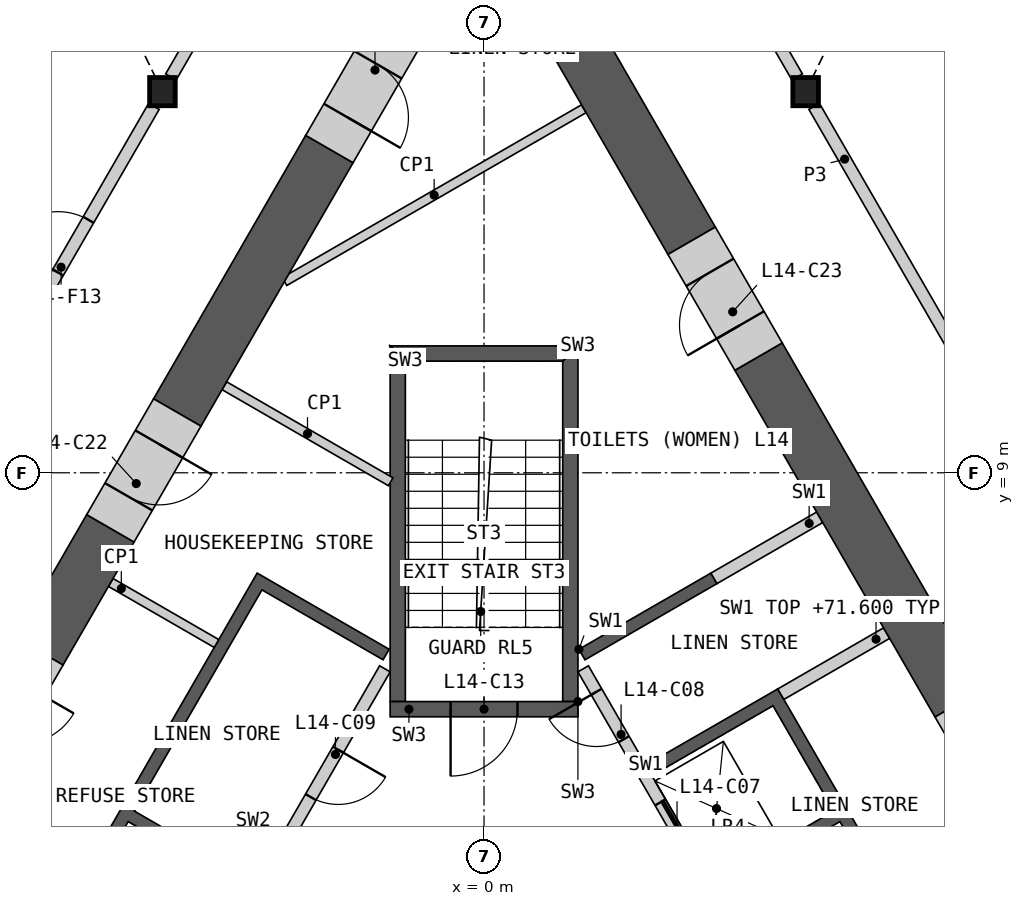
"""IFC4 building model, lengths in metres.
Left out: names, types, materials, properties, quantities, classifications, styles, units other than length and angle.
Written with IfcOpenShell. Run it as: python <this file> out.ifc"""

import sys

from ifc_helpers import new_model, si_unit, direction, frame, frame_2d, origin, origin_2d, place, context, subcontext, project, spatial, polyline, rectangle, i_section, outline, extrude, element, fill, save


model = new_model("IFC4")
c1 = context("Model", 3, precision=1e-05, world=origin(), true_north=direction((0.0, 1.0)))
c2 = subcontext(c1, "Body", "Model", "MODEL_VIEW")
j1 = project(units=[si_unit("LENGTHUNIT", "METRE"), si_unit("PLANEANGLEUNIT", "RADIAN")], contexts=[c1])
p1 = place(None, origin())
s1 = spatial("IfcSite", under=j1, at=p1, CompositionType="ELEMENT")
p2 = place(p1, origin())
s2 = spatial("IfcBuilding", under=s1, at=p2, CompositionType="ELEMENT")
p3 = place(p2, frame((0.0, 0.0, 67.8)))
s3 = spatial("IfcBuildingStorey", under=s2, at=p3, CompositionType="ELEMENT", Elevation=67.8)
for number, where, z_axis, x_axis in (
    (1, (-5.289, 15.269, 0.0), (0.0, 0.0, 1.0), (1.0, 0.0, 0.0)),
    (2, (5.289, 15.269, 0.0), (0.0, 0.0, 1.0), (1.0, 0.0, 0.0)),
):
    element("IfcColumn", number, at=place(p3, frame(where, z_axis=z_axis, x_axis=x_axis)), inside=s3, PredefinedType="COLUMN", context=c2, shape_type="SweptSolid", body=[
        extrude(i_section(OverallWidth=0.421, OverallDepth=0.465, WebThickness=0.045, FlangeThickness=0.072, at=origin_2d()), origin(), (0.0, 0.0, 1.0), 4.2),
    ])
p4 = place(p3, origin())
e3 = element("IfcWall", 3, at=p4, inside=s3, PredefinedType="SHEAR", context=c2, shape_type="SweptSolid", body=[
    extrude(outline(polyline([(1.561, 6.097), (3.731, 7.35), (3.831, 7.177), (1.66, 5.924), (1.561, 6.097)])), origin(), (0.0, 0.0, 1.0), 3.8),
])
p5 = place(p3, origin())
e4 = element("IfcWall", 4, at=p5, inside=s3, PredefinedType="SHEAR", context=c2, shape_type="SweptSolid", body=[
    extrude(outline(polyline([(2.66, 4.192), (4.831, 5.445), (8.231, -0.444), (6.061, -1.697), (5.96, -1.524), (7.952, -0.374), (6.952, 1.358), (4.96, 0.208), (4.861, 0.381), (6.852, 1.531), (5.852, 3.263), (3.861, 2.113), (3.76, 2.287), (5.752, 3.437), (4.752, 5.169), (2.76, 4.019), (2.66, 4.192)])), origin(), (0.0, 0.0, 1.0), 3.8),
])
p6 = place(p3, frame((5.817, -1.476, 0.0), z_axis=(0.0, 0.0, 1.0), x_axis=(-0.500002616675, 0.866023893041, 0.0)))
e5 = element("IfcWall", 5, at=p6, inside=s3, PredefinedType="SOLIDWALL", context=c2, shape_type="SweptSolid", body=[
    extrude(rectangle(XDim=8.373, YDim=0.2, at=frame_2d((4.187, 0.0))), origin(), (0.0, 0.0, 1.0), 3.8),
])
p7 = place(p6, frame((0.337, 0.0, 0.0)))
e6 = element("IfcOpeningElement", 6, at=p7, cuts=e5, PredefinedType="OPENING", context=c2, shape_type="SweptSolid", body=[
    extrude(rectangle(XDim=1.1, YDim=2.1, at=frame_2d((0.55, 1.05))), frame((0.0, 0.11, 0.0), z_axis=(0.0, -1.0, 0.0), x_axis=(1.0, 0.0, 0.0)), (0.0, 0.0, 1.0), 0.22),
])
p8 = place(p6, frame((2.537, 0.0, 0.0)))
e7 = element("IfcOpeningElement", 7, at=p8, cuts=e5, PredefinedType="OPENING", context=c2, shape_type="SweptSolid", body=[
    extrude(rectangle(XDim=1.1, YDim=2.1, at=frame_2d((0.55, 1.05))), frame((0.0, 0.11, 0.0), z_axis=(0.0, -1.0, 0.0), x_axis=(1.0, 0.0, 0.0)), (0.0, 0.0, 1.0), 0.22),
])
p9 = place(p6, frame((4.737, 0.0, 0.0)))
e8 = element("IfcOpeningElement", 8, at=p9, cuts=e5, PredefinedType="OPENING", context=c2, shape_type="SweptSolid", body=[
    extrude(rectangle(XDim=1.1, YDim=2.1, at=frame_2d((0.55, 1.05))), frame((0.0, 0.11, 0.0), z_axis=(0.0, -1.0, 0.0), x_axis=(1.0, 0.0, 0.0)), (0.0, 0.0, 1.0), 0.22),
])
p10 = place(p6, frame((7.037, 0.0, 0.0)))
e9 = element("IfcOpeningElement", 9, at=p10, cuts=e5, PredefinedType="OPENING", context=c2, shape_type="SweptSolid", body=[
    extrude(rectangle(XDim=0.9, YDim=2.1, at=frame_2d((0.45, 1.05))), frame((0.0, 0.11, 0.0), z_axis=(0.0, -1.0, 0.0), x_axis=(1.0, 0.0, 0.0)), (0.0, 0.0, 1.0), 0.22),
])
p11 = place(p3, frame((4.881, 5.358, 0.0), z_axis=(0.0, 0.0, 1.0), x_axis=(0.866035824272, 0.499981950752, 0.0)))
e10 = element("IfcWall", 10, at=p11, inside=s3, PredefinedType="SHEAR", context=c2, shape_type="SweptSolid", body=[
    extrude(rectangle(XDim=2.009, YDim=0.2, at=frame_2d((1.004, 0.0))), origin(), (0.0, 0.0, 1.0), 3.8),
])
p12 = place(p3, frame((3.781, 7.263, 0.0), z_axis=(0.0, 0.0, 1.0), x_axis=(0.865983199114, 0.50007309351, 0.0)))
e11 = element("IfcWall", 11, at=p12, inside=s3, PredefinedType="SHEAR", context=c2, shape_type="SweptSolid", body=[
    extrude(rectangle(XDim=2.009, YDim=0.2, at=frame_2d((1.004, 0.0))), origin(), (0.0, 0.0, 1.0), 3.8),
])
p13 = place(p3, origin())
e12 = element("IfcWall", 12, at=p13, inside=s3, PredefinedType="SHEAR", context=c2, shape_type="SweptSolid", body=[
    extrude(outline(polyline([(-4.96, 0.208), (-7.131, 1.461), (-3.731, 7.35), (-1.561, 6.097), (-1.66, 5.924), (-3.652, 7.074), (-5.752, 3.437), (-3.76, 2.287), (-3.861, 2.113), (-5.852, 3.263), (-6.852, 1.531), (-4.861, 0.381), (-4.96, 0.208)])), origin(), (0.0, 0.0, 1.0), 3.8),
])
p14 = place(p3, frame((-1.631, 5.776, 0.0), z_axis=(0.0, 0.0, 1.0), x_axis=(-0.499992876559, -0.866029516466, 0.0)))
e13 = element("IfcWall", 13, at=p14, inside=s3, PredefinedType="SOLIDWALL", context=c2, shape_type="SweptSolid", body=[
    extrude(rectangle(XDim=6.486, YDim=0.2, at=frame_2d((3.243, 0.0))), origin(), (0.0, 0.0, 1.0), 3.8),
])
p15 = place(p14, frame((1.537, 0.0, 0.0)))
e14 = element("IfcOpeningElement", 14, at=p15, cuts=e13, PredefinedType="OPENING", context=c2, shape_type="SweptSolid", body=[
    extrude(rectangle(XDim=0.9, YDim=2.1, at=frame_2d((0.45, 1.05))), frame((0.0, 0.11, 0.0), z_axis=(0.0, -1.0, 0.0), x_axis=(1.0, 0.0, 0.0)), (0.0, 0.0, 1.0), 0.22),
])
p16 = place(p3, origin())
e15 = element("IfcWall", 15, at=p16, inside=s3, PredefinedType="SHEAR", context=c2, shape_type="SweptSolid", body=[
    extrude(outline(polyline([(1.544, 5.237), (1.544, 11.087), (1.294, 10.837), (1.294, 5.237), (1.544, 5.237)])), origin(), (0.0, 0.0, 1.0), 3.8),
])
p17 = place(p3, origin())
e16 = element("IfcWall", 16, at=p17, inside=s3, PredefinedType="SHEAR", context=c2, shape_type="SweptSolid", body=[
    extrude(outline(polyline([(1.544, 11.087), (-1.544, 11.087), (-1.294, 10.837), (1.294, 10.837), (1.544, 11.087)])), origin(), (0.0, 0.0, 1.0), 3.8),
])
p18 = place(p3, origin())
e17 = element("IfcWall", 17, at=p18, inside=s3, PredefinedType="SHEAR", context=c2, shape_type="SweptSolid", body=[
    extrude(outline(polyline([(-1.294, 10.837), (-1.544, 11.087), (-1.544, 5.237), (-1.294, 5.237), (-1.294, 10.837)])), origin(), (0.0, 0.0, 1.0), 3.8),
])
p19 = place(p3, frame((1.544, 5.112, 0.0), z_axis=(0.0, 0.0, 1.0), x_axis=(-1.0, 0.0, 0.0)))
e18 = element("IfcWall", 18, at=p19, inside=s3, PredefinedType="SHEAR", context=c2, shape_type="SweptSolid", body=[
    extrude(rectangle(XDim=3.088, YDim=0.25, at=frame_2d((1.544, 0.0))), origin(), (0.0, 0.0, 1.0), 3.8),
])
p20 = place(p19, frame((0.994, 0.0, 0.0)))
e19 = element("IfcOpeningElement", 19, at=p20, cuts=e18, PredefinedType="OPENING", context=c2, shape_type="SweptSolid", body=[
    extrude(rectangle(XDim=1.1, YDim=2.1, at=frame_2d((0.55, 1.05))), frame((0.0, 0.135, 0.0), z_axis=(0.0, -1.0, 0.0), x_axis=(1.0, 0.0, 0.0)), (0.0, 0.0, 1.0), 0.27),
])
p21 = place(p3, frame((-6.139, 7.196, 0.0), z_axis=(0.0, 0.0, 1.0), x_axis=(0.866035824272, -0.499981950752, 0.0)))
e20 = element("IfcWall", 20, at=p21, inside=s3, PredefinedType="PARTITIONING", context=c2, shape_type="SweptSolid", body=[
    extrude(rectangle(XDim=2.009, YDim=0.15, at=frame_2d((1.004, 0.0))), origin(), (0.0, 0.0, 1.0), 3.8),
])
p22 = place(p3, frame((-4.271, 10.432, 0.0), z_axis=(0.0, 0.0, 1.0), x_axis=(0.866018279777, -0.50001233894, 0.0)))
e21 = element("IfcWall", 21, at=p22, inside=s3, PredefinedType="PARTITIONING", context=c2, shape_type="SweptSolid", body=[
    extrude(rectangle(XDim=3.159, YDim=0.15, at=frame_2d((1.58, 0.0))), origin(), (0.0, 0.0, 1.0), 3.8),
])
p23 = place(p3, frame((1.641, 14.987, 0.0), z_axis=(0.0, 0.0, 1.0), x_axis=(-0.86602253128, -0.50000497529, 0.0)))
e22 = element("IfcWall", 22, at=p23, inside=s3, PredefinedType="PARTITIONING", context=c2, shape_type="SweptSolid", body=[
    extrude(rectangle(XDim=5.685, YDim=0.15, at=frame_2d((2.843, 0.0))), origin(), (0.0, 0.0, 1.0), 3.8),
])
p24 = place(p3, frame((7.807, 5.208, 0.0), z_axis=(0.0, 0.0, 1.0), x_axis=(-0.499986664161, 0.866033103098, 0.0)))
e23 = element("IfcWall", 23, at=p24, inside=s3, PredefinedType="SHEAR", context=c2, shape_type="SweptSolid", body=[
    extrude(rectangle(XDim=6.586, YDim=0.9, at=frame_2d((3.293, 0.0))), origin(), (0.0, 0.0, 1.0), 3.8),
])
p25 = place(p3, frame((3.414, 12.816, 0.0), z_axis=(0.0, 0.0, 1.0), x_axis=(-0.500006596359, 0.866021595341, 0.0)))
e24 = element("IfcWall", 24, at=p25, inside=s3, PredefinedType="SHEAR", context=c2, shape_type="SweptSolid", body=[
    extrude(rectangle(XDim=6.049, YDim=0.9, at=frame_2d((3.025, 0.0))), origin(), (0.0, 0.0, 1.0), 3.8),
])
p26 = place(p3, frame((-2.543, 14.325, 0.0), z_axis=(0.0, 0.0, 1.0), x_axis=(-0.500006859004, -0.866021443701, 0.0)))
e25 = element("IfcWall", 25, at=p26, inside=s3, PredefinedType="SHEAR", context=c2, shape_type="SweptSolid", body=[
    extrude(rectangle(XDim=5.003, YDim=0.9, at=frame_2d((2.502, 0.0))), origin(), (0.0, 0.0, 1.0), 3.8),
])
p27 = place(p3, frame((-6.145, 8.086, 0.0), z_axis=(0.0, 0.0, 1.0), x_axis=(-0.500026924946, -0.866009858102, 0.0)))
e26 = element("IfcWall", 26, at=p27, inside=s3, PredefinedType="SHEAR", context=c2, shape_type="SweptSolid", body=[
    extrude(rectangle(XDim=2.337, YDim=0.9, at=frame_2d((1.168, 0.0))), origin(), (0.0, 0.0, 1.0), 3.8),
])
p28 = place(p3, frame((8.907, 3.302, 0.0), z_axis=(0.0, 0.0, 1.0), x_axis=(-0.50002983664, 0.866008176907, 0.0)))
e27 = element("IfcWall", 27, at=p28, inside=s3, PredefinedType="SHEAR", context=c2, shape_type="SweptSolid", body=[
    extrude(rectangle(XDim=2.2, YDim=0.9, at=frame_2d((1.1, 0.0))), origin(), (0.0, 0.0, 1.0), 3.8),
])
p29 = place(p28, frame((0.6, 0.0, 0.0)))
e28 = element("IfcOpeningElement", 28, at=p29, cuts=e27, PredefinedType="OPENING", context=c2, shape_type="SweptSolid", body=[
    extrude(rectangle(XDim=1.0, YDim=2.1, at=frame_2d((0.5, 1.05))), frame((0.0, 0.46, 0.0), z_axis=(0.0, -1.0, 0.0), x_axis=(1.0, 0.0, 0.0)), (0.0, 0.0, 1.0), 0.92),
])
p30 = place(p3, frame((-7.313, 6.062, 0.0), z_axis=(0.0, 0.0, 1.0), x_axis=(-0.500077893725, -0.86598042715, 0.0)))
e29 = element("IfcWall", 29, at=p30, inside=s3, PredefinedType="SHEAR", context=c2, shape_type="SweptSolid", body=[
    extrude(rectangle(XDim=2.2, YDim=0.9, at=frame_2d((1.1, 0.0))), origin(), (0.0, 0.0, 1.0), 3.8),
])
p31 = place(p30, frame((0.6, 0.0, 0.0)))
e30 = element("IfcOpeningElement", 30, at=p31, cuts=e29, PredefinedType="OPENING", context=c2, shape_type="SweptSolid", body=[
    extrude(rectangle(XDim=1.0, YDim=2.1, at=frame_2d((0.5, 1.05))), frame((0.0, 0.46, 0.0), z_axis=(0.0, -1.0, 0.0), x_axis=(1.0, 0.0, 0.0)), (0.0, 0.0, 1.0), 0.92),
])
p32 = place(p3, frame((-5.045, 9.992, 0.0), z_axis=(0.0, 0.0, 1.0), x_axis=(-0.499898558967, -0.866083962871, 0.0)))
e31 = element("IfcWall", 31, at=p32, inside=s3, PredefinedType="SHEAR", context=c2, shape_type="SweptSolid", body=[
    extrude(rectangle(XDim=2.2, YDim=0.9, at=frame_2d((1.1, 0.0))), origin(), (0.0, 0.0, 1.0), 3.8),
])
p33 = place(p32, frame((0.6, 0.0, 0.0)))
e32 = element("IfcOpeningElement", 32, at=p33, cuts=e31, PredefinedType="OPENING", context=c2, shape_type="SweptSolid", body=[
    extrude(rectangle(XDim=1.0, YDim=2.1, at=frame_2d((0.5, 1.05))), frame((0.0, 0.46, 0.0), z_axis=(0.0, -1.0, 0.0), x_axis=(1.0, 0.0, 0.0)), (0.0, 0.0, 1.0), 0.92),
])
p34 = place(p3, frame((4.514, 10.911, 0.0), z_axis=(0.0, 0.0, 1.0), x_axis=(-0.50002983664, 0.866008176907, 0.0)))
e33 = element("IfcWall", 33, at=p34, inside=s3, PredefinedType="SHEAR", context=c2, shape_type="SweptSolid", body=[
    extrude(rectangle(XDim=2.2, YDim=0.9, at=frame_2d((1.1, 0.0))), origin(), (0.0, 0.0, 1.0), 3.8),
])
p35 = place(p34, frame((0.6, 0.0, 0.0)))
e34 = element("IfcOpeningElement", 34, at=p35, cuts=e33, PredefinedType="OPENING", context=c2, shape_type="SweptSolid", body=[
    extrude(rectangle(XDim=1.0, YDim=2.1, at=frame_2d((0.5, 1.05))), frame((0.0, 0.46, 0.0), z_axis=(0.0, -1.0, 0.0), x_axis=(1.0, 0.0, 0.0)), (0.0, 0.0, 1.0), 0.92),
])
p36 = place(p3, frame((-1.443, 16.23, 0.0), z_axis=(0.0, 0.0, 1.0), x_axis=(-0.50002983664, -0.866008176907, 0.0)))
e35 = element("IfcWall", 35, at=p36, inside=s3, PredefinedType="SHEAR", context=c2, shape_type="SweptSolid", body=[
    extrude(rectangle(XDim=2.2, YDim=0.9, at=frame_2d((1.1, 0.0))), origin(), (0.0, 0.0, 1.0), 3.8),
])
p37 = place(p36, frame((0.6, 0.0, 0.0)))
e36 = element("IfcOpeningElement", 36, at=p37, cuts=e35, PredefinedType="OPENING", context=c2, shape_type="SweptSolid", body=[
    extrude(rectangle(XDim=1.0, YDim=2.1, at=frame_2d((0.5, 1.05))), frame((0.0, 0.46, 0.0), z_axis=(0.0, -1.0, 0.0), x_axis=(1.0, 0.0, 0.0)), (0.0, 0.0, 1.0), 0.92),
])
p38 = place(p3, frame((-10.439, 6.35, 0.0), z_axis=(0.0, 0.0, 1.0), x_axis=(0.50001002959, 0.86601961312, 0.0)))
e37 = element("IfcWall", 37, at=p38, inside=s3, PredefinedType="PARTITIONING", context=c2, shape_type="SweptSolid", body=[
    extrude(rectangle(XDim=10.019, YDim=0.2, at=frame_2d((5.009, 0.0))), origin(), (0.0, 0.0, 1.0), 3.8),
])
p39 = place(p38, frame((6.865, 0.0, 0.0)))
e38 = element("IfcOpeningElement", 38, at=p39, cuts=e37, PredefinedType="OPENING", context=c2, shape_type="SweptSolid", body=[
    extrude(rectangle(XDim=1.0, YDim=2.1, at=frame_2d((0.5, 1.05))), frame((0.0, 0.11, 0.0), z_axis=(0.0, -1.0, 0.0), x_axis=(1.0, 0.0, 0.0)), (0.0, 0.0, 1.0), 0.22),
])
p40 = place(p38, frame((1.854, 0.0, 0.0)))
e39 = element("IfcOpeningElement", 39, at=p40, cuts=e37, PredefinedType="OPENING", context=c2, shape_type="SweptSolid", body=[
    extrude(rectangle(XDim=1.0, YDim=2.1, at=frame_2d((0.5, 1.05))), frame((0.0, 0.11, 0.0), z_axis=(0.0, -1.0, 0.0), x_axis=(1.0, 0.0, 0.0)), (0.0, 0.0, 1.0), 0.22),
])
p41 = place(p3, frame((5.429, 15.026, 0.0), z_axis=(0.0, 0.0, 1.0), x_axis=(0.50001002959, -0.86601961312, 0.0)))
e40 = element("IfcWall", 40, at=p41, inside=s3, PredefinedType="PARTITIONING", context=c2, shape_type="SweptSolid", body=[
    extrude(rectangle(XDim=10.019, YDim=0.2, at=frame_2d((5.009, 0.0))), origin(), (0.0, 0.0, 1.0), 3.8),
])
p42 = place(p41, frame((7.165, 0.0, 0.0)))
e41 = element("IfcOpeningElement", 41, at=p42, cuts=e40, PredefinedType="OPENING", context=c2, shape_type="SweptSolid", body=[
    extrude(rectangle(XDim=1.0, YDim=2.1, at=frame_2d((0.5, 1.05))), frame((0.0, 0.11, 0.0), z_axis=(0.0, -1.0, 0.0), x_axis=(1.0, 0.0, 0.0)), (0.0, 0.0, 1.0), 0.22),
])
p43 = place(p3, frame((1.913, 21.116, 0.0), z_axis=(0.0, 0.0, 1.0), x_axis=(0.500001069878, -0.866024786089, 0.0)))
e42 = element("IfcWall", 42, at=p43, inside=s3, PredefinedType="PARTITIONING", context=c2, shape_type="SweptSolid", body=[
    extrude(rectangle(XDim=6.473, YDim=0.2, at=frame_2d((3.236, 0.0))), origin(), (0.0, 0.0, 1.0), 3.8),
])
p44 = place(p43, frame((2.787, 0.0, 0.0)))
e43 = element("IfcOpeningElement", 43, at=p44, cuts=e42, PredefinedType="OPENING", context=c2, shape_type="SweptSolid", body=[
    extrude(rectangle(XDim=1.0, YDim=2.1, at=frame_2d((0.5, 1.05))), frame((0.0, 0.11, 0.0), z_axis=(0.0, -1.0, 0.0), x_axis=(1.0, 0.0, 0.0)), (0.0, 0.0, 1.0), 0.22),
])
p45 = place(p3, frame((-5.149, 15.511, 0.0), z_axis=(0.0, 0.0, 1.0), x_axis=(0.500001069878, 0.866024786089, 0.0)))
e44 = element("IfcWall", 44, at=p45, inside=s3, PredefinedType="PARTITIONING", context=c2, shape_type="SweptSolid", body=[
    extrude(rectangle(XDim=6.473, YDim=0.2, at=frame_2d((3.236, 0.0))), origin(), (0.0, 0.0, 1.0), 3.8),
])
p46 = place(p45, frame((4.614, 0.0, 0.0)))
e45 = element("IfcOpeningElement", 45, at=p46, cuts=e44, PredefinedType="OPENING", context=c2, shape_type="SweptSolid", body=[
    extrude(rectangle(XDim=1.0, YDim=2.1, at=frame_2d((0.5, 1.05))), frame((0.0, 0.11, 0.0), z_axis=(0.0, -1.0, 0.0), x_axis=(1.0, 0.0, 0.0)), (0.0, 0.0, 1.0), 0.22),
])
p47 = place(p9, origin())
e46 = element("IfcDoor", 46, at=p47, inside=s3, OperationType="SLIDING_TO_LEFT", PredefinedType="DOOR", context=c2, shape_type="SweptSolid", body=[
    extrude(rectangle(XDim=1.1, YDim=2.1, at=frame_2d((0.55, 1.05))), frame((0.0, 0.025, 0.0), z_axis=(0.0, -1.0, 0.0), x_axis=(1.0, 0.0, 0.0)), (0.0, 0.0, 1.0), 0.05),
])
fill(e8, e46)
p48 = place(p10, origin())
e47 = element("IfcDoor", 47, at=p48, inside=s3, OperationType="SINGLE_SWING_RIGHT", PredefinedType="DOOR", context=c2, shape_type="SweptSolid", body=[
    extrude(rectangle(XDim=0.9, YDim=2.1, at=frame_2d((0.45, 1.05))), frame((0.0, 0.025, 0.0), z_axis=(0.0, -1.0, 0.0), x_axis=(1.0, 0.0, 0.0)), (0.0, 0.0, 1.0), 0.05),
])
fill(e9, e47)
p49 = place(p15, origin())
e48 = element("IfcDoor", 48, at=p49, inside=s3, OperationType="SINGLE_SWING_LEFT", PredefinedType="DOOR", context=c2, shape_type="SweptSolid", body=[
    extrude(rectangle(XDim=0.9, YDim=2.1, at=frame_2d((0.45, 1.05))), frame((0.0, 0.025, 0.0), z_axis=(0.0, -1.0, 0.0), x_axis=(1.0, 0.0, 0.0)), (0.0, 0.0, 1.0), 0.05),
])
fill(e14, e48)
p50 = place(p20, origin())
e49 = element("IfcDoor", 49, at=p50, inside=s3, OperationType="SINGLE_SWING_RIGHT", PredefinedType="DOOR", context=c2, shape_type="SweptSolid", body=[
    extrude(rectangle(XDim=1.1, YDim=2.1, at=frame_2d((0.55, 1.05))), frame((0.0, 0.025, 0.0), z_axis=(0.0, -1.0, 0.0), x_axis=(1.0, 0.0, 0.0)), (0.0, 0.0, 1.0), 0.05),
])
fill(e19, e49)
p51 = place(p33, origin())
e50 = element("IfcDoor", 50, at=p51, inside=s3, OperationType="SINGLE_SWING_LEFT", PredefinedType="DOOR", context=c2, shape_type="SweptSolid", body=[
    extrude(rectangle(XDim=1.0, YDim=2.1, at=frame_2d((0.5, 1.05))), frame((0.0, 0.205, 0.0), z_axis=(0.0, -1.0, 0.0), x_axis=(1.0, 0.0, 0.0)), (0.0, 0.0, 1.0), 0.05),
])
fill(e32, e50)
p52 = place(p35, origin())
e51 = element("IfcDoor", 51, at=p52, inside=s3, OperationType="SINGLE_SWING_LEFT", PredefinedType="DOOR", context=c2, shape_type="SweptSolid", body=[
    extrude(rectangle(XDim=1.0, YDim=2.1, at=frame_2d((0.5, 1.05))), frame((0.0, 0.205, 0.0), z_axis=(0.0, -1.0, 0.0), x_axis=(1.0, 0.0, 0.0)), (0.0, 0.0, 1.0), 0.05),
])
fill(e34, e51)
p53 = place(p37, origin())
e52 = element("IfcDoor", 52, at=p53, inside=s3, OperationType="SINGLE_SWING_RIGHT", PredefinedType="DOOR", context=c2, shape_type="SweptSolid", body=[
    extrude(rectangle(XDim=1.0, YDim=2.1, at=frame_2d((0.5, 1.05))), frame((0.0, 0.205, 0.0), z_axis=(0.0, -1.0, 0.0), x_axis=(1.0, 0.0, 0.0)), (0.0, 0.0, 1.0), 0.05),
])
fill(e36, e52)
p54 = place(p39, origin())
e53 = element("IfcDoor", 53, at=p54, inside=s3, OperationType="SINGLE_SWING_LEFT", PredefinedType="DOOR", context=c2, shape_type="SweptSolid", body=[
    extrude(rectangle(XDim=1.0, YDim=2.1, at=frame_2d((0.5, 1.05))), frame((0.0, 0.025, 0.0), z_axis=(0.0, -1.0, 0.0), x_axis=(1.0, 0.0, 0.0)), (0.0, 0.0, 1.0), 0.05),
])
fill(e38, e53)
save(model, sys.argv[1])
